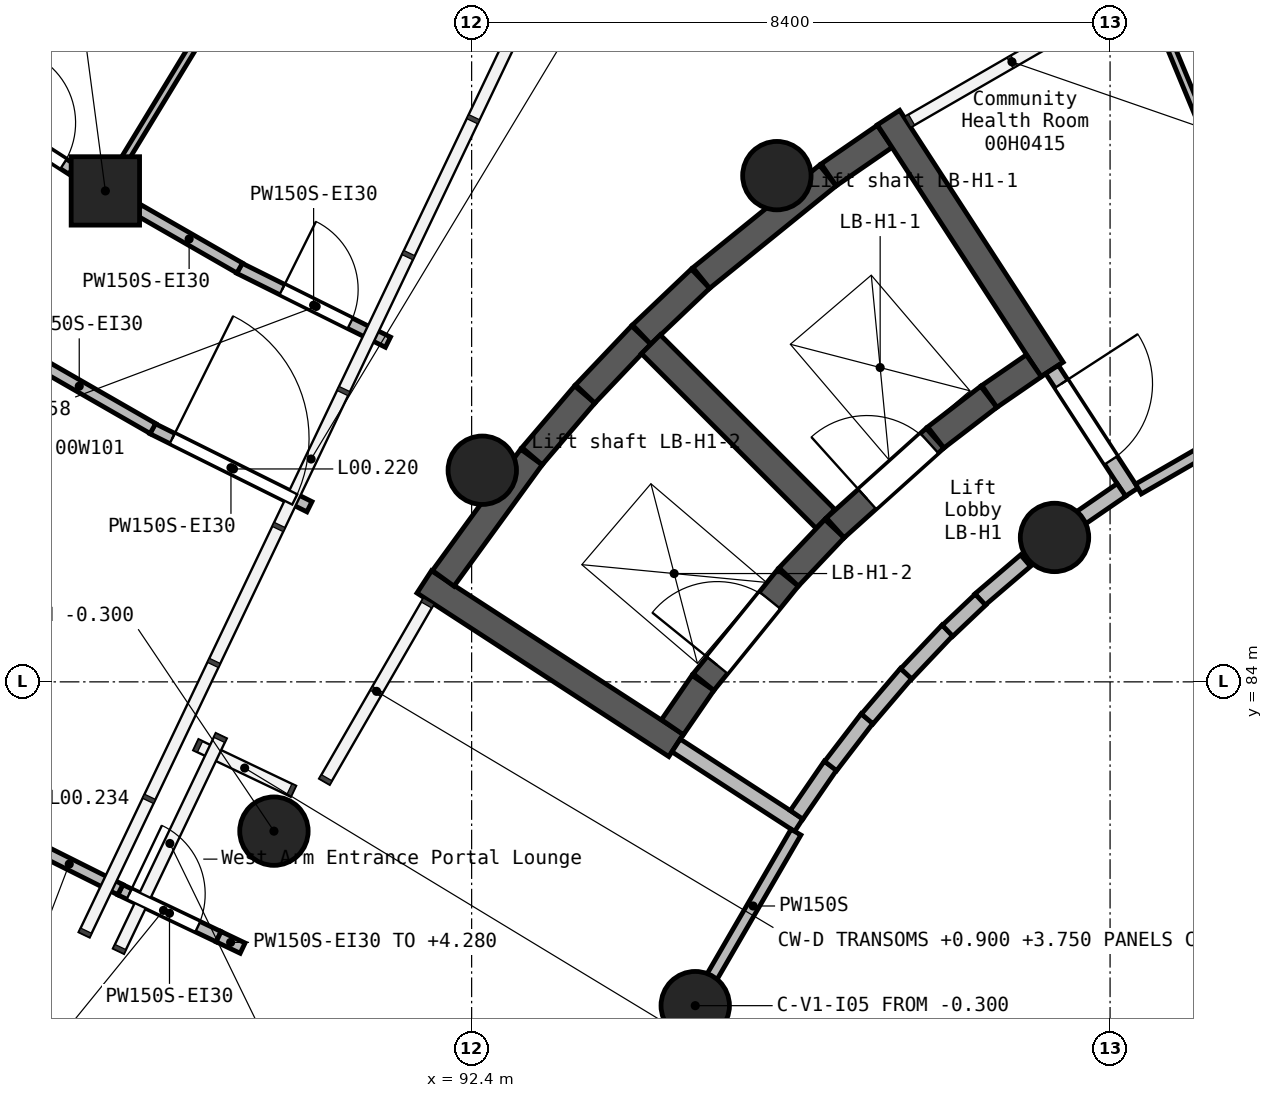
"""IFC4 building model, lengths in metres.
Left out: names, types, materials, properties, quantities, classifications, styles, units other than length and angle.
Written with IfcOpenShell. Run it as: python <this file> out.ifc"""

import sys

from ifc_helpers import new_model, si_unit, direction, frame, frame_2d, origin, origin_2d, place, context, subcontext, project, spatial, rectangle, circle, extrude, element, fill, save


model = new_model("IFC4")
c1 = context("Model", 3, precision=1e-05, world=origin(), true_north=direction((0.0, 1.0)))
c2 = subcontext(c1, "Body", "Model", "MODEL_VIEW")
j1 = project(units=[si_unit("LENGTHUNIT", "METRE"), si_unit("PLANEANGLEUNIT", "RADIAN")], contexts=[c1])
p1 = place(None, origin())
s1 = spatial("IfcSite", under=j1, at=p1, CompositionType="ELEMENT")
p2 = place(p1, origin())
s2 = spatial("IfcBuilding", under=s1, at=p2, CompositionType="ELEMENT")
p3 = place(p2, origin())
s3 = spatial("IfcBuildingStorey", under=s2, at=p3, CompositionType="ELEMENT", Elevation=0.0)
p4 = place(p3, frame((87.581, 90.459, -0.3), z_axis=(0.0, 0.0, 1.0), x_axis=(1.0, 0.0, 0.0)))
e1 = element("IfcColumn", 1, at=p4, inside=s3, PredefinedType="COLUMN", context=c2, shape_type="SweptSolid", body=[
    extrude(rectangle(XDim=0.9, YDim=0.9, at=origin_2d()), origin(), (0.0, 0.0, 1.0), 5.7),
])
for number, where, z_axis, x_axis in (
    (2, (89.799, 82.036, -0.3), (0.0, 0.0, 1.0), (1.0, 0.0, 0.0)),
    (3, (92.54, 86.784, -0.3), (0.0, 0.0, 1.0), (1.0, 0.0, 0.0)),
    (4, (95.342, 79.74, -0.3), (0.0, 0.0, 1.0), (1.0, 0.0, 0.0)),
    (5, (96.416, 90.66, -0.3), (0.0, 0.0, 1.0), (1.0, 0.0, 0.0)),
    (6, (100.069, 85.9, -0.3), (0.0, 0.0, 1.0), (1.0, 0.0, 0.0)),
):
    element("IfcColumn", number, at=place(p3, frame(where, z_axis=z_axis, x_axis=x_axis)), inside=s3, PredefinedType="COLUMN", context=c2, shape_type="SweptSolid", body=[
        extrude(circle(Radius=0.45, at=origin_2d()), origin(), (0.0, 0.0, 1.0), 5.7),
    ])
p5 = place(p3, frame((91.776, 85.315, -0.3), z_axis=(0.0, 0.0, 1.0), x_axis=(0.838710342359, -0.544577782893, 0.0)))
e7 = element("IfcWall", 7, at=p5, inside=s3, PredefinedType="SHEAR", context=c2, shape_type="SweptSolid", body=[
    extrude(rectangle(XDim=3.951, YDim=0.35, at=frame_2d((1.976, 0.0))), origin(), (0.0, 0.0, 1.0), 5.7),
])
p6 = place(p3, frame((93.187, 86.958, -0.3), z_axis=(0.0, 0.0, 1.0), x_axis=(-0.588083467619, -0.808800244259, 0.0)))
e8 = element("IfcWall", 8, at=p6, inside=s3, PredefinedType="SHEAR", context=c2, shape_type="SweptSolid", body=[
    extrude(rectangle(XDim=1.974, YDim=0.35, at=frame_2d((0.987, 0.0))), origin(), (0.0, 0.0, 1.0), 5.7),
])
p7 = place(p3, frame((93.195, 86.969, -0.3), z_axis=(0.0, 0.0, 1.0), x_axis=(0.649301127712, 0.760531423119, 0.0)))
e9 = element("IfcWall", 9, at=p7, inside=s3, PredefinedType="SHEAR", context=c2, shape_type="SweptSolid", body=[
    extrude(rectangle(XDim=1.067, YDim=0.35, at=frame_2d((0.533, 0.0))), origin(), (0.0, 0.0, 1.0), 5.7),
])
p8 = place(p3, frame((93.894, 87.787, -0.3), z_axis=(0.0, 0.0, 1.0), x_axis=(0.688725463476, 0.725022231356, 0.0)))
e10 = element("IfcWall", 10, at=p8, inside=s3, PredefinedType="SHEAR", context=c2, shape_type="SweptSolid", body=[
    extrude(rectangle(XDim=1.07, YDim=0.35, at=frame_2d((0.535, 0.0))), origin(), (0.0, 0.0, 1.0), 5.7),
])
p9 = place(p3, frame((94.637, 88.569, -0.3), z_axis=(0.0, 0.0, 1.0), x_axis=(0.724948027673, 0.688803569367, 0.0)))
e11 = element("IfcWall", 11, at=p9, inside=s3, PredefinedType="SHEAR", context=c2, shape_type="SweptSolid", body=[
    extrude(rectangle(XDim=1.067, YDim=0.35, at=frame_2d((0.534, 0.0))), origin(), (0.0, 0.0, 1.0), 5.7),
])
p10 = place(p3, frame((94.758, 88.442, -0.3), z_axis=(0.0, 0.0, 1.0), x_axis=(0.707106781187, -0.707106781187, 0.0)))
e12 = element("IfcWall", 12, at=p10, inside=s3, PredefinedType="SHEAR", context=c2, shape_type="SweptSolid", body=[
    extrude(rectangle(XDim=3.249, YDim=0.35, at=frame_2d((1.625, 0.0))), origin(), (0.0, 0.0, 1.0), 5.7),
])
p11 = place(p3, frame((95.042, 83.403, -0.3), z_axis=(0.0, 0.0, 1.0), x_axis=(0.566587399165, 0.824001649942, 0.0)))
e13 = element("IfcWall", 13, at=p11, inside=s3, PredefinedType="SHEAR", context=c2, shape_type="SweptSolid", body=[
    extrude(rectangle(XDim=0.708, YDim=0.35, at=frame_2d((0.354, 0.0))), origin(), (0.0, 0.0, 1.0), 5.7),
])
p12 = place(p3, frame((95.451, 83.997, -0.3), z_axis=(0.0, 0.0, 1.0), x_axis=(0.629337420675, 0.777132170829, 0.0)))
e14 = element("IfcWall", 14, at=p12, inside=s3, PredefinedType="SHEAR", context=c2, shape_type="SweptSolid", body=[
    extrude(rectangle(XDim=1.766, YDim=0.35, at=frame_2d((0.883, 0.0))), origin(), (0.0, 0.0, 1.0), 5.7),
])
p13 = place(p12, frame((0.286, 0.0, 0.3)))
e15 = element("IfcOpeningElement", 15, at=p13, cuts=e14, PredefinedType="OPENING", context=c2, shape_type="SweptSolid", body=[
    extrude(rectangle(XDim=1.1, YDim=2.1, at=frame_2d((0.55, 1.05))), frame((0.0, 0.185, 0.0), z_axis=(0.0, -1.0, 0.0), x_axis=(1.0, 0.0, 0.0)), (0.0, 0.0, 1.0), 0.37),
])
p14 = place(p3, frame((96.572, 85.38, -0.3), z_axis=(0.0, 0.0, 1.0), x_axis=(0.687613208908, 0.726077182491, 0.0)))
e16 = element("IfcWall", 16, at=p14, inside=s3, PredefinedType="SHEAR", context=c2, shape_type="SweptSolid", body=[
    extrude(rectangle(XDim=0.876, YDim=0.35, at=frame_2d((0.438, 0.0))), origin(), (0.0, 0.0, 1.0), 5.7),
])
p15 = place(p3, frame((97.087, 90.662, -0.3), z_axis=(0.0, 0.0, 1.0), x_axis=(-0.777231602748, -0.629214618146, 0.0)))
e17 = element("IfcWall", 17, at=p15, inside=s3, PredefinedType="SHEAR", context=c2, shape_type="SweptSolid", body=[
    extrude(rectangle(XDim=2.143, YDim=0.35, at=frame_2d((1.071, 0.0))), origin(), (0.0, 0.0, 1.0), 5.7),
])
p16 = place(p3, frame((97.098, 90.67, -0.3), z_axis=(0.0, 0.0, 1.0), x_axis=(0.823914707919, 0.566713820261, 0.0)))
e18 = element("IfcWall", 18, at=p16, inside=s3, PredefinedType="SHEAR", context=c2, shape_type="SweptSolid", body=[
    extrude(rectangle(XDim=0.896, YDim=0.35, at=frame_2d((0.448, 0.0))), origin(), (0.0, 0.0, 1.0), 5.7),
])
p17 = place(p3, frame((97.184, 86.026, -0.3), z_axis=(0.0, 0.0, 1.0), x_axis=(0.743452252039, 0.668789016759, 0.0)))
e19 = element("IfcWall", 19, at=p17, inside=s3, PredefinedType="SHEAR", context=c2, shape_type="SweptSolid", body=[
    extrude(rectangle(XDim=1.766, YDim=0.35, at=frame_2d((0.883, 0.0))), origin(), (0.0, 0.0, 1.0), 5.7),
])
p18 = place(p17, frame((0.566, 0.0, 0.3)))
e20 = element("IfcOpeningElement", 20, at=p18, cuts=e19, PredefinedType="OPENING", context=c2, shape_type="SweptSolid", body=[
    extrude(rectangle(XDim=1.1, YDim=2.1, at=frame_2d((0.55, 1.05))), frame((0.0, 0.185, 0.0), z_axis=(0.0, -1.0, 0.0), x_axis=(1.0, 0.0, 0.0)), (0.0, 0.0, 1.0), 0.37),
])
p19 = place(p3, frame((97.885, 91.424, -0.3), z_axis=(0.0, 0.0, 1.0), x_axis=(0.544577782893, -0.838710342359, 0.0)))
e21 = element("IfcWall", 21, at=p19, inside=s3, PredefinedType="SHEAR", context=c2, shape_type="SweptSolid", body=[
    extrude(rectangle(XDim=3.951, YDim=0.35, at=frame_2d((1.976, 0.0))), origin(), (0.0, 0.0, 1.0), 5.7),
])
p20 = place(p3, frame((98.507, 87.215, -0.3), z_axis=(0.0, 0.0, 1.0), x_axis=(0.793181366791, 0.608985483715, 0.0)))
e22 = element("IfcWall", 22, at=p20, inside=s3, PredefinedType="SHEAR", context=c2, shape_type="SweptSolid", body=[
    extrude(rectangle(XDim=0.879, YDim=0.35, at=frame_2d((0.439, 0.0))), origin(), (0.0, 0.0, 1.0), 5.7),
])
p21 = place(p3, frame((99.212, 87.756, -0.3), z_axis=(0.0, 0.0, 1.0), x_axis=(0.824031893461, 0.566543412776, 0.0)))
e23 = element("IfcWall", 23, at=p21, inside=s3, PredefinedType="SHEAR", context=c2, shape_type="SweptSolid", body=[
    extrude(rectangle(XDim=0.71, YDim=0.35, at=frame_2d((0.355, 0.0))), origin(), (0.0, 0.0, 1.0), 5.7),
])
p22 = place(p3, frame((95.09, 83.164, 0.0), z_axis=(0.0, 0.0, 1.0), x_axis=(0.838626157518, -0.544707414973, 0.0)))
e24 = element("IfcWall", 24, at=p22, inside=s3, PredefinedType="SOLIDWALL", context=c2, shape_type="SweptSolid", body=[
    extrude(rectangle(XDim=1.925, YDim=0.2, at=frame_2d((0.962, 0.0))), origin(), (0.0, 0.0, 1.0), 5.05),
])
p23 = place(p3, frame((100.036, 88.11, 0.0), z_axis=(0.0, 0.0, 1.0), x_axis=(0.544618190689, -0.838684104041, 0.0)))
e25 = element("IfcWall", 25, at=p23, inside=s3, PredefinedType="SOLIDWALL", context=c2, shape_type="SweptSolid", body=[
    extrude(rectangle(XDim=1.925, YDim=0.2, at=frame_2d((0.962, 0.0))), origin(), (0.0, 0.0, 1.0), 5.05),
])
p24 = place(p23, frame((0.225, 0.0, 0.0)))
e26 = element("IfcOpeningElement", 26, at=p24, cuts=e25, PredefinedType="OPENING", context=c2, shape_type="SweptSolid", body=[
    extrude(rectangle(XDim=1.2, YDim=2.1, at=frame_2d((0.6, 1.05))), frame((0.0, 0.11, 0.0), z_axis=(0.0, -1.0, 0.0), x_axis=(1.0, 0.0, 0.0)), (0.0, 0.0, 1.0), 0.22),
])
p25 = place(p3, frame((100.383, 86.135, 0.0), z_axis=(0.0, 0.0, 1.0), x_axis=(0.823886668557, 0.56675458302, 0.0)))
e27 = element("IfcWall", 27, at=p25, inside=s3, PredefinedType="SOLIDWALL", context=c2, shape_type="SweptSolid", body=[
    extrude(rectangle(XDim=0.688, YDim=0.2, at=frame_2d((0.344, 0.0))), origin(), (0.0, 0.0, 1.0), 5.05),
])
p26 = place(p3, frame((96.675, 82.25, 0.0), z_axis=(0.0, 0.0, 1.0), x_axis=(0.566515670131, 0.824050966564, 0.0)))
e28 = element("IfcWall", 28, at=p26, inside=s3, PredefinedType="SOLIDWALL", context=c2, shape_type="SweptSolid", body=[
    extrude(rectangle(XDim=0.788, YDim=0.2, at=frame_2d((0.394, 0.0))), origin(), (0.0, 0.0, 1.0), 5.05),
])
p27 = place(p3, frame((97.123, 82.892, 0.0), z_axis=(0.0, 0.0, 1.0), x_axis=(0.608859474519, 0.793278097699, 0.0)))
e29 = element("IfcWall", 29, at=p27, inside=s3, PredefinedType="SOLIDWALL", context=c2, shape_type="SweptSolid", body=[
    extrude(rectangle(XDim=0.79, YDim=0.2, at=frame_2d((0.395, 0.0))), origin(), (0.0, 0.0, 1.0), 5.05),
])
for number, where, z_axis, x_axis in (
    (30, (97.605, 83.512, 0.0), (0.0, 0.0, 1.0), (0.649, 0.76, 0.0)),
    (31, (99.087, 85.082, 0.0), (0.0, 0.0, 1.0), (0.76, 0.649, 0.0)),
):
    element("IfcWall", number, at=place(p3, frame(where, z_axis=z_axis, x_axis=x_axis)), inside=s3, PredefinedType="SOLIDWALL", context=c2, shape_type="SweptSolid", body=[
        extrude(rectangle(XDim=0.79, YDim=0.2, at=frame_2d((0.395, 0.0))), origin(), (0.0, 0.0, 1.0), 5.05),
    ])
p28 = place(p3, frame((98.118, 84.106, 0.0), z_axis=(0.0, 0.0, 1.0), x_axis=(0.687693231893, 0.726001390363, 0.0)))
e32 = element("IfcWall", 32, at=p28, inside=s3, PredefinedType="SOLIDWALL", context=c2, shape_type="SweptSolid", body=[
    extrude(rectangle(XDim=0.79, YDim=0.2, at=frame_2d((0.395, 0.0))), origin(), (0.0, 0.0, 1.0), 5.05),
])
p29 = place(p3, frame((98.662, 84.672, 0.0), z_axis=(0.0, 0.0, 1.0), x_axis=(0.725920352122, 0.687778774298, 0.0)))
e33 = element("IfcWall", 33, at=p29, inside=s3, PredefinedType="SOLIDWALL", context=c2, shape_type="SweptSolid", body=[
    extrude(rectangle(XDim=0.595, YDim=0.2, at=frame_2d((0.298, 0.0))), origin(), (0.0, 0.0, 1.0), 5.05),
])
p30 = place(p3, frame((88.201, 87.331, 0.0), z_axis=(0.0, 0.0, 1.0), x_axis=(0.895335597875, -0.445392149883, 0.0)))
e34 = element("IfcWall", 34, at=p30, inside=s3, PredefinedType="PARTITIONING", context=c2, shape_type="SweptSolid", body=[
    extrude(rectangle(XDim=2.307, YDim=0.15, at=frame_2d((1.153, 0.0))), origin(), (0.0, 0.0, 1.0), 5.05),
])
p31 = place(p30, frame((0.291, 0.0, 0.0)))
e35 = element("IfcOpeningElement", 35, at=p31, cuts=e34, PredefinedType="OPENING", context=c2, shape_type="SweptSolid", body=[
    extrude(rectangle(XDim=1.8, YDim=2.1, at=frame_2d((0.9, 1.05))), frame((0.0, 0.085, 0.0), z_axis=(0.0, -1.0, 0.0), x_axis=(1.0, 0.0, 0.0)), (0.0, 0.0, 1.0), 0.17),
])
p32 = place(p3, frame((86.268, 88.446, 0.0), z_axis=(0.0, 0.0, 1.0), x_axis=(0.867212921502, -0.497937494852, 0.0)))
e36 = element("IfcWall", 36, at=p32, inside=s3, PredefinedType="PARTITIONING", context=c2, shape_type="SweptSolid", body=[
    extrude(rectangle(XDim=2.235, YDim=0.15, at=frame_2d((1.118, 0.0))), origin(), (0.0, 0.0, 1.0), 5.05),
])
p33 = place(p3, frame((89.343, 89.442, 0.0), z_axis=(0.0, 0.0, 1.0), x_axis=(0.895274815557, -0.445514314731, 0.0)))
e37 = element("IfcWall", 37, at=p33, inside=s3, PredefinedType="PARTITIONING", context=c2, shape_type="SweptSolid", body=[
    extrude(rectangle(XDim=2.185, YDim=0.15, at=frame_2d((1.092, 0.0))), origin(), (0.0, 0.0, 1.0), 5.05),
])
p34 = place(p33, frame((0.63, 0.0, 0.0)))
e38 = element("IfcOpeningElement", 38, at=p34, cuts=e37, PredefinedType="OPENING", context=c2, shape_type="SweptSolid", body=[
    extrude(rectangle(XDim=1.0, YDim=2.1, at=frame_2d((0.5, 1.05))), frame((0.0, 0.085, 0.0), z_axis=(0.0, -1.0, 0.0), x_axis=(1.0, 0.0, 0.0)), (0.0, 0.0, 1.0), 0.17),
])
p35 = place(p3, frame((85.744, 91.642, 0.0), z_axis=(0.0, 0.0, 1.0), x_axis=(0.840848932624, -0.54126987031, 0.0)))
e39 = element("IfcWall", 39, at=p35, inside=s3, PredefinedType="PARTITIONING", context=c2, shape_type="SweptSolid", body=[
    extrude(rectangle(XDim=1.662, YDim=0.15, at=frame_2d((0.831, 0.0))), origin(), (0.0, 0.0, 1.0), 5.05),
])
p36 = place(p35, frame((0.53, 0.0, 0.0)))
e40 = element("IfcOpeningElement", 40, at=p36, cuts=e39, PredefinedType="OPENING", context=c2, shape_type="SweptSolid", body=[
    extrude(rectangle(XDim=1.0, YDim=2.1, at=frame_2d((0.5, 1.05))), frame((0.0, 0.085, 0.0), z_axis=(0.0, -1.0, 0.0), x_axis=(1.0, 0.0, 0.0)), (0.0, 0.0, 1.0), 0.17),
])
p37 = place(p3, frame((88.018, 90.208, 0.0), z_axis=(0.0, 0.0, 1.0), x_axis=(0.867174234795, -0.498004865947, 0.0)))
e41 = element("IfcWall", 41, at=p37, inside=s3, PredefinedType="PARTITIONING", context=c2, shape_type="SweptSolid", body=[
    extrude(rectangle(XDim=1.535, YDim=0.15, at=frame_2d((0.768, 0.0))), origin(), (0.0, 0.0, 1.0), 5.05),
])
p38 = place(p3, frame((87.778, 81.264, 0.0), z_axis=(0.0, 0.0, 1.0), x_axis=(0.902557824877, -0.430568662066, 0.0)))
e42 = element("IfcWall", 42, at=p38, inside=s3, PredefinedType="PARTITIONING", context=c2, shape_type="SweptSolid", body=[
    extrude(rectangle(XDim=1.432, YDim=0.15, at=frame_2d((0.716, 0.0))), origin(), (0.0, 0.0, 1.0), 5.05),
])
p39 = place(p38, frame((0.129, 0.0, 0.0)))
e43 = element("IfcOpeningElement", 43, at=p39, cuts=e42, PredefinedType="OPENING", context=c2, shape_type="SweptSolid", body=[
    extrude(rectangle(XDim=1.0, YDim=2.1, at=frame_2d((0.5, 1.05))), frame((0.0, 0.085, 0.0), z_axis=(0.0, -1.0, 0.0), x_axis=(1.0, 0.0, 0.0)), (0.0, 0.0, 1.0), 0.17),
])
p40 = place(p3, frame((89.071, 80.648, 0.0), z_axis=(0.0, 0.0, 1.0), x_axis=(0.902641205527, -0.43039383602, 0.0)))
e44 = element("IfcWall", 44, at=p40, inside=s3, PredefinedType="PARTITIONING", context=c2, shape_type="SweptSolid", body=[
    extrude(rectangle(XDim=0.35, YDim=0.15, at=frame_2d((0.175, 0.0))), origin(), (0.0, 0.0, 1.0), 4.28),
])
p41 = place(p3, frame((86.434, 81.938, 0.0), z_axis=(0.0, 0.0, 1.0), x_axis=(0.894297168166, -0.447473546717, 0.0)))
e45 = element("IfcWall", 45, at=p41, inside=s3, PredefinedType="PARTITIONING", context=c2, shape_type="SweptSolid", body=[
    extrude(rectangle(XDim=1.503, YDim=0.15, at=frame_2d((0.751, 0.0))), origin(), (0.0, 0.0, 1.0), 5.05),
])
p42 = place(p3, frame((95.539, 80.08, 0.0), z_axis=(0.0, 0.0, 1.0), x_axis=(0.501978236605, 0.864880251812, 0.0)))
e46 = element("IfcWall", 46, at=p42, inside=s3, PredefinedType="PARTITIONING", context=c2, shape_type="SweptSolid", body=[
    extrude(rectangle(XDim=2.247, YDim=0.15, at=frame_2d((1.124, 0.0))), origin(), (0.0, 0.0, 1.0), 5.05),
])
p43 = place(p3, frame((101.174, 86.538, 0.0), z_axis=(0.0, 0.0, 1.0), x_axis=(0.86596515875, 0.500104332946, 0.0)))
e47 = element("IfcWall", 47, at=p43, inside=s3, PredefinedType="PARTITIONING", context=c2, shape_type="SweptSolid", body=[
    extrude(rectangle(XDim=2.583, YDim=0.15, at=frame_2d((1.291, 0.0))), origin(), (0.0, 0.0, 1.0), 5.05),
])
p44 = place(p3, frame((87.84, 90.885, 0.0), z_axis=(0.0, 0.0, 1.0), x_axis=(0.519618801015, 0.854398210223, 0.0)))
e48 = element("IfcWall", 48, at=p44, inside=s3, PredefinedType="PARTITIONING", context=c2, shape_type="SweptSolid", body=[
    extrude(rectangle(XDim=4.603, YDim=0.1, at=frame_2d((2.302, 0.0))), origin(), (0.0, 0.0, 1.0), 5.05),
])
p45 = place(p3, frame((101.469, 92.665, 0.0), z_axis=(0.0, 0.0, 1.0), x_axis=(0.382715329854, -0.923866319494, 0.0)))
e49 = element("IfcWall", 49, at=p45, inside=s3, PredefinedType="PARTITIONING", context=c2, shape_type="SweptSolid", body=[
    extrude(rectangle(XDim=5.121, YDim=0.1, at=frame_2d((2.56, 0.0))), origin(), (0.0, 0.0, 1.0), 5.05),
])
p46 = place(p31, origin())
e50 = element("IfcDoor", 50, at=p46, inside=s3, OperationType="DOUBLE_DOOR_SINGLE_SWING", PredefinedType="DOOR", context=c2, shape_type="SweptSolid", body=[
    extrude(rectangle(XDim=1.8, YDim=2.1, at=frame_2d((0.9, 1.05))), frame((0.0, 0.025, 0.0), z_axis=(0.0, -1.0, 0.0), x_axis=(1.0, 0.0, 0.0)), (0.0, 0.0, 1.0), 0.05),
])
fill(e35, e50)
p47 = place(p24, frame((1.2, 0.0, 0.0), z_axis=(0.0, 0.0, 1.0), x_axis=(-1.0, 0.0, 0.0)))
e51 = element("IfcDoor", 51, at=p47, inside=s3, OperationType="SINGLE_SWING_RIGHT", PredefinedType="DOOR", context=c2, shape_type="SweptSolid", body=[
    extrude(rectangle(XDim=1.2, YDim=2.1, at=frame_2d((0.6, 1.05))), frame((0.0, 0.025, 0.0), z_axis=(0.0, -1.0, 0.0), x_axis=(1.0, 0.0, 0.0)), (0.0, 0.0, 1.0), 0.05),
])
fill(e26, e51)
p48 = place(p34, origin())
e52 = element("IfcDoor", 52, at=p48, inside=s3, OperationType="SINGLE_SWING_RIGHT", PredefinedType="DOOR", context=c2, shape_type="SweptSolid", body=[
    extrude(rectangle(XDim=1.0, YDim=2.1, at=frame_2d((0.5, 1.05))), frame((0.0, 0.025, 0.0), z_axis=(0.0, -1.0, 0.0), x_axis=(1.0, 0.0, 0.0)), (0.0, 0.0, 1.0), 0.05),
])
fill(e38, e52)
p49 = place(p36, origin())
e53 = element("IfcDoor", 53, at=p49, inside=s3, OperationType="SINGLE_SWING_RIGHT", PredefinedType="DOOR", context=c2, shape_type="SweptSolid", body=[
    extrude(rectangle(XDim=1.0, YDim=2.1, at=frame_2d((0.5, 1.05))), frame((0.0, 0.025, 0.0), z_axis=(0.0, -1.0, 0.0), x_axis=(1.0, 0.0, 0.0)), (0.0, 0.0, 1.0), 0.05),
])
fill(e40, e53)
p50 = place(p39, origin())
e54 = element("IfcDoor", 54, at=p50, inside=s3, OperationType="SINGLE_SWING_LEFT", PredefinedType="DOOR", context=c2, shape_type="SweptSolid", body=[
    extrude(rectangle(XDim=1.0, YDim=2.1, at=frame_2d((0.5, 1.05))), frame((0.0, 0.025, 0.0), z_axis=(0.0, -1.0, 0.0), x_axis=(1.0, 0.0, 0.0)), (0.0, 0.0, 1.0), 0.05),
])
fill(e43, e54)
p51 = place(p18, origin())
e55 = element("IfcDoor", 55, at=p51, inside=s3, OperationType="DOUBLE_DOOR_SLIDING", PredefinedType="DOOR", context=c2, shape_type="SweptSolid", body=[
    extrude(rectangle(XDim=1.1, YDim=2.1, at=frame_2d((0.55, 1.05))), frame((0.0, 0.025, 0.0), z_axis=(0.0, -1.0, 0.0), x_axis=(1.0, 0.0, 0.0)), (0.0, 0.0, 1.0), 0.05),
])
fill(e20, e55)
p52 = place(p13, origin())
e56 = element("IfcDoor", 56, at=p52, inside=s3, OperationType="DOUBLE_DOOR_SLIDING", PredefinedType="DOOR", context=c2, shape_type="SweptSolid", body=[
    extrude(rectangle(XDim=1.1, YDim=2.1, at=frame_2d((0.55, 1.05))), frame((0.0, 0.025, 0.0), z_axis=(0.0, -1.0, 0.0), x_axis=(1.0, 0.0, 0.0)), (0.0, 0.0, 1.0), 0.05),
])
fill(e15, e56)
save(model, sys.argv[1])
